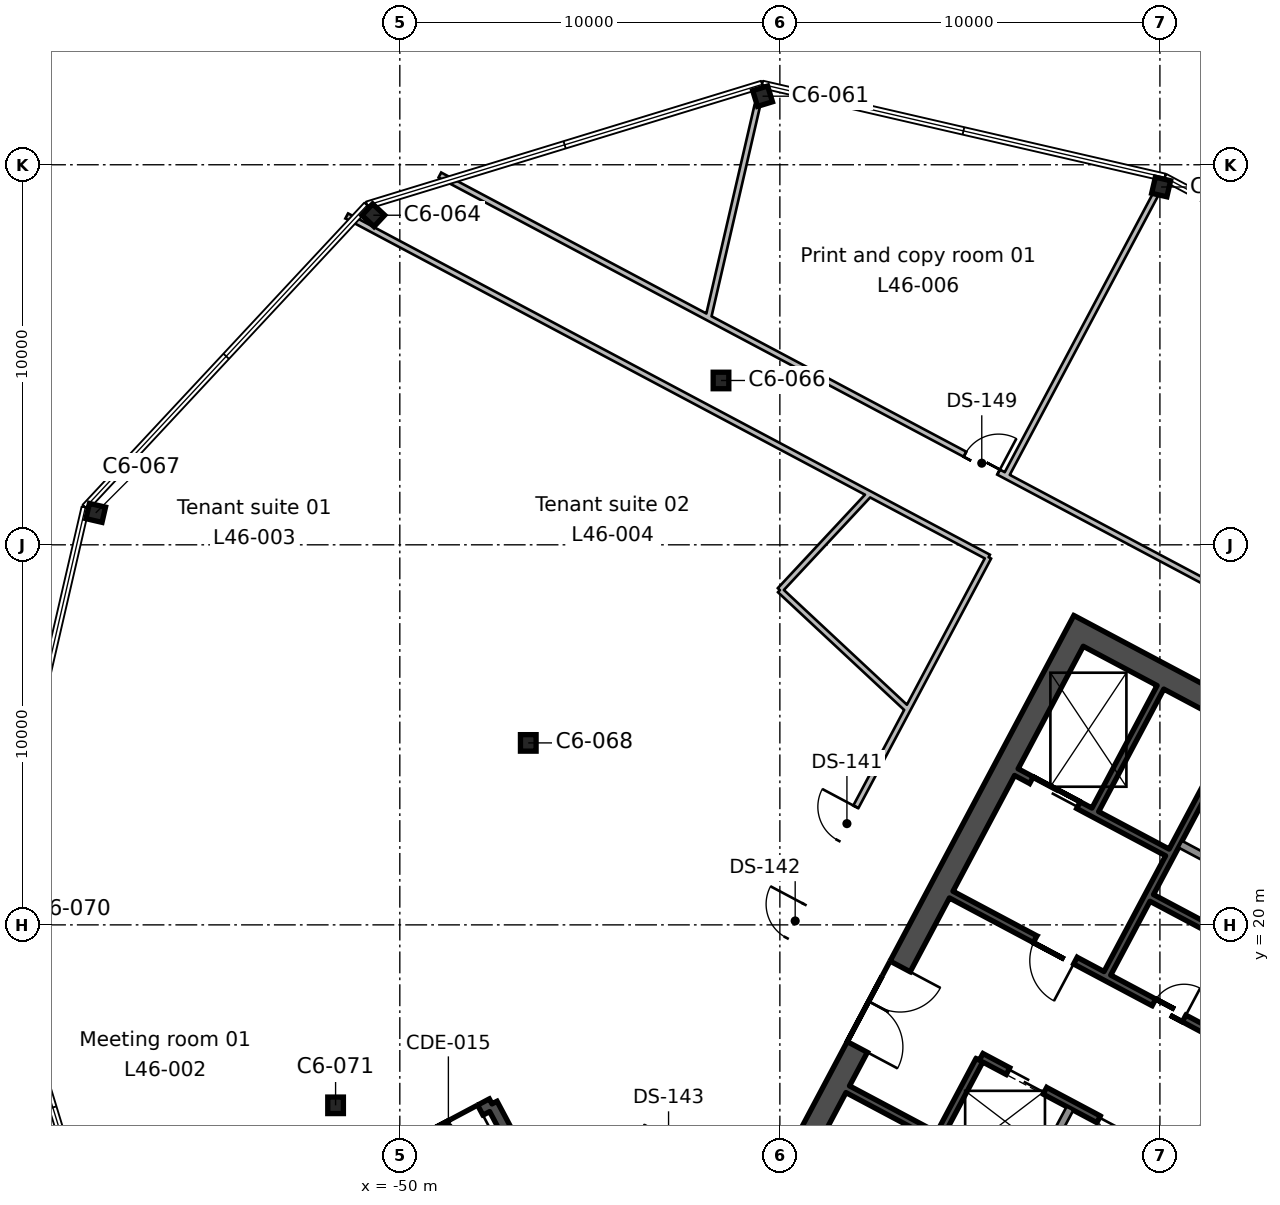
"""IFC4 building model, lengths in metres.
Left out: names, types, materials, properties, quantities, classifications, styles, units other than length and angle.
Written with IfcOpenShell. Run it as: python <this file> out.ifc"""

import sys

from ifc_helpers import new_model, si_unit, direction, frame, frame_2d, origin, origin_2d, place, context, subcontext, project, spatial, rectangle, i_section, extrude, element, fill, save


model = new_model("IFC4")
c1 = context("Model", 3, precision=1e-05, world=origin(), true_north=direction((0.0, 1.0)))
c2 = subcontext(c1, "Body", "Model", "MODEL_VIEW")
j1 = project(units=[si_unit("LENGTHUNIT", "METRE"), si_unit("PLANEANGLEUNIT", "RADIAN")], contexts=[c1])
p1 = place(None, origin())
s1 = spatial("IfcSite", under=j1, at=p1, CompositionType="ELEMENT")
p2 = place(p1, origin())
s2 = spatial("IfcBuilding", under=s1, at=p2, CompositionType="ELEMENT")
p3 = place(p2, frame((0.0, 0.0, 213.0)))
s3 = spatial("IfcBuildingStorey", under=s2, at=p3, CompositionType="ELEMENT", Elevation=213.0)
for number, where, z_axis, x_axis in (
    (1, (-51.69, 15.252, 0.0), (0.0, 0.0, 1.0), (1.0, 0.0, 0.0)),
    (2, (-46.62, 24.788, 0.0), (0.0, 0.0, 1.0), (1.0, 0.0, 0.0)),
    (3, (-58.001, 30.84, 0.0), (0.0, 0.0, 1.0), (-0.225, -0.974, 0.0)),
    (4, (-41.549, 34.324, 0.0), (0.0, 0.0, 1.0), (1.0, 0.0, 0.0)),
    (5, (-50.697, 38.672, 0.0), (0.0, 0.0, 1.0), (-0.682, -0.731, 0.0)),
    (6, (-29.968, 39.415, 0.0), (0.0, 0.0, 1.0), (-0.974, 0.225, 0.0)),
    (7, (-40.455, 41.804, 0.0), (0.0, 0.0, 1.0), (-0.956, -0.292, 0.0)),
):
    element("IfcColumn", number, at=place(p3, frame(where, z_axis=z_axis, x_axis=x_axis)), inside=s3, PredefinedType="COLUMN", context=c2, shape_type="SweptSolid", body=[
        extrude(i_section(OverallWidth=0.412, OverallDepth=0.434, WebThickness=0.036, FlangeThickness=0.057, FilletRadius=0.015, at=origin_2d()), origin(), (0.0, 0.0, 1.0), 3.9),
    ])
p4 = place(p3, frame((-32.0, 28.001, 0.0), z_axis=(0.0, 0.0, 1.0), x_axis=(-0.469468958625, -0.882948977511, 0.0)))
e8 = element("IfcWall", 8, at=p4, inside=s3, PredefinedType="SHEAR", context=c2, shape_type="SweptSolid", body=[
    extrude(rectangle(XDim=19.4, YDim=0.6, at=frame_2d((9.7, 0.0))), origin(), (0.0, 0.0, 1.0), 3.9),
])
p5 = place(p4, frame((10.3, 0.0, 0.0)))
e9 = element("IfcOpeningElement", 9, at=p5, cuts=e8, PredefinedType="OPENING", context=c2, shape_type="SweptSolid", body=[
    extrude(rectangle(XDim=2.4, YDim=2.4, at=frame_2d((1.2, 1.2))), frame((0.0, 0.31, 0.0), z_axis=(0.0, -1.0, 0.0), x_axis=(1.0, 0.0, 0.0)), (0.0, 0.0, 1.0), 0.62),
])
p6 = place(p3, frame((-14.041, 18.112, 0.0), z_axis=(0.0, 0.0, 1.0), x_axis=(-0.882947755831, 0.46947125628, 0.0)))
e10 = element("IfcWall", 10, at=p6, inside=s3, PredefinedType="SHEAR", context=c2, shape_type="SweptSolid", body=[
    extrude(rectangle(XDim=20.2, YDim=0.6, at=frame_2d((10.1, 0.0))), origin(), (0.0, 0.0, 1.0), 3.9),
])
p7 = place(p3, frame((-32.366, 15.171, 0.0), z_axis=(0.0, 0.0, 1.0), x_axis=(-0.469487830541, -0.882938942948, 0.0)))
e11 = element("IfcWall", 11, at=p7, inside=s3, PredefinedType="SOLIDWALL", context=c2, shape_type="SweptSolid", body=[
    extrude(rectangle(XDim=2.2, YDim=0.2, at=frame_2d((1.1, 0.0))), origin(), (0.0, 0.0, 1.0), 3.9),
])
p8 = place(p3, frame((-27.955, 25.171, 0.0), z_axis=(0.0, 0.0, 1.0), x_axis=(-0.469480409012, -0.88294288918, 0.0)))
e12 = element("IfcWall", 12, at=p8, inside=s3, PredefinedType="SHEAR", context=c2, shape_type="SweptSolid", body=[
    extrude(rectangle(XDim=7.3, YDim=0.2, at=frame_2d((3.65, 0.0))), origin(), (0.0, 0.0, 1.0), 3.9),
])
p9 = place(p3, frame((-34.75, 16.438, 0.0), z_axis=(0.0, 0.0, 1.0), x_axis=(-0.469401318492, -0.882984938828, 0.0)))
e13 = element("IfcWall", 13, at=p9, inside=s3, PredefinedType="SHEAR", context=c2, shape_type="SweptSolid", body=[
    extrude(rectangle(XDim=2.2, YDim=0.2, at=frame_2d((1.1, 0.0))), origin(), (0.0, 0.0, 1.0), 3.9),
])
p10 = place(p3, frame((-29.986, 26.25, 0.0), z_axis=(0.0, 0.0, 1.0), x_axis=(-0.469494272526, -0.882935517501, 0.0)))
e14 = element("IfcWall", 14, at=p10, inside=s3, PredefinedType="SHEAR", context=c2, shape_type="SweptSolid", body=[
    extrude(rectangle(XDim=3.65, YDim=0.2, at=frame_2d((1.825, 0.0))), origin(), (0.0, 0.0, 1.0), 3.9),
])
p11 = place(p3, frame((-24.872, 19.68, 0.0), z_axis=(0.0, 0.0, 1.0), x_axis=(-0.882953967957, 0.469459572775, 0.0)))
e15 = element("IfcWall", 15, at=p11, inside=s3, PredefinedType="SOLIDWALL", context=c2, shape_type="SweptSolid", body=[
    extrude(rectangle(XDim=5.2, YDim=0.2, at=frame_2d((2.6, 0.0))), origin(), (0.0, 0.0, 1.0), 3.9),
])
p12 = place(p3, frame((-29.804, 21.906, 0.0), z_axis=(0.0, 0.0, 1.0), x_axis=(-0.882960433586, 0.469447412093, 0.0)))
e16 = element("IfcWall", 16, at=p12, inside=s3, PredefinedType="SHEAR", context=c2, shape_type="SweptSolid", body=[
    extrude(rectangle(XDim=4.5, YDim=0.2, at=frame_2d((2.25, 0.0))), origin(), (0.0, 0.0, 1.0), 3.9),
])
p13 = place(p12, frame((2.65, 0.0, 0.0)))
e17 = element("IfcOpeningElement", 17, at=p13, cuts=e16, PredefinedType="OPENING", context=c2, shape_type="SweptSolid", body=[
    extrude(rectangle(XDim=1.4, YDim=2.4, at=frame_2d((0.7, 1.2))), frame((0.0, 0.11, 0.0), z_axis=(0.0, -1.0, 0.0), x_axis=(1.0, 0.0, 0.0)), (0.0, 0.0, 1.0), 0.22),
])
p14 = place(p3, frame((-25.623, 18.268, 0.0), z_axis=(0.0, 0.0, 1.0), x_axis=(-0.882953967957, 0.469459572775, 0.0)))
e18 = element("IfcWall", 18, at=p14, inside=s3, PredefinedType="SHEAR", context=c2, shape_type="SweptSolid", body=[
    extrude(rectangle(XDim=5.2, YDim=0.2, at=frame_2d((2.6, 0.0))), origin(), (0.0, 0.0, 1.0), 3.9),
])
p15 = place(p3, frame((-26.662, 16.102, 0.0), z_axis=(0.0, 0.0, 1.0), x_axis=(-0.882940221191, 0.469485426614, 0.0)))
e19 = element("IfcWall", 19, at=p15, inside=s3, PredefinedType="SHEAR", context=c2, shape_type="SweptSolid", body=[
    extrude(rectangle(XDim=10.0, YDim=0.2, at=frame_2d((5.0, 0.0))), origin(), (0.0, 0.0, 1.0), 3.9),
])
p16 = place(p15, frame((6.3, 0.0, 0.0)))
e20 = element("IfcOpeningElement", 20, at=p16, cuts=e19, PredefinedType="OPENING", context=c2, shape_type="SweptSolid", body=[
    extrude(rectangle(XDim=1.2, YDim=2.1, at=frame_2d((0.6, 1.05))), frame((0.0, 0.11, 0.0), z_axis=(0.0, -1.0, 0.0), x_axis=(1.0, 0.0, 0.0)), (0.0, 0.0, 1.0), 0.22),
])
p17 = place(p15, frame((0.36, 0.0, 0.0)))
e21 = element("IfcOpeningElement", 21, at=p17, cuts=e19, PredefinedType="OPENING", context=c2, shape_type="SweptSolid", body=[
    extrude(rectangle(XDim=0.9, YDim=2.1, at=frame_2d((0.45, 1.05))), frame((0.0, 0.11, 0.0), z_axis=(0.0, -1.0, 0.0), x_axis=(1.0, 0.0, 0.0)), (0.0, 0.0, 1.0), 0.22),
])
p18 = place(p15, frame((3.06, 0.0, 0.0)))
e22 = element("IfcOpeningElement", 22, at=p18, cuts=e19, PredefinedType="OPENING", context=c2, shape_type="SweptSolid", body=[
    extrude(rectangle(XDim=0.9, YDim=2.1, at=frame_2d((0.45, 1.05))), frame((0.0, 0.11, 0.0), z_axis=(0.0, -1.0, 0.0), x_axis=(1.0, 0.0, 0.0)), (0.0, 0.0, 1.0), 0.22),
])
p19 = place(p3, frame((-29.935, 13.991, 0.0), z_axis=(0.0, 0.0, 1.0), x_axis=(-0.882952937579, 0.469461510692, 0.0)))
e23 = element("IfcWall", 23, at=p19, inside=s3, PredefinedType="SHEAR", context=c2, shape_type="SweptSolid", body=[
    extrude(rectangle(XDim=5.4, YDim=0.2, at=frame_2d((2.7, 0.0))), origin(), (0.0, 0.0, 1.0), 3.9),
])
p20 = place(p19, frame((0.8, 0.0, 0.0)))
e24 = element("IfcOpeningElement", 24, at=p20, cuts=e23, PredefinedType="OPENING", context=c2, shape_type="SweptSolid", body=[
    extrude(rectangle(XDim=1.1, YDim=2.1, at=frame_2d((0.55, 1.05))), frame((0.0, 0.11, 0.0), z_axis=(0.0, -1.0, 0.0), x_axis=(1.0, 0.0, 0.0)), (0.0, 0.0, 1.0), 0.22),
])
p21 = place(p19, frame((3.5, 0.0, 0.0)))
e25 = element("IfcOpeningElement", 25, at=p21, cuts=e23, PredefinedType="OPENING", context=c2, shape_type="SweptSolid", body=[
    extrude(rectangle(XDim=1.1, YDim=2.1, at=frame_2d((0.55, 1.05))), frame((0.0, 0.11, 0.0), z_axis=(0.0, -1.0, 0.0), x_axis=(1.0, 0.0, 0.0)), (0.0, 0.0, 1.0), 0.22),
])
p22 = place(p3, frame((-31.15, 11.919, 0.0), z_axis=(0.0, 0.0, 1.0), x_axis=(-0.882940221191, 0.469485426614, 0.0)))
e26 = element("IfcWall", 26, at=p22, inside=s3, PredefinedType="SHEAR", context=c2, shape_type="SweptSolid", body=[
    extrude(rectangle(XDim=8.0, YDim=0.2, at=frame_2d((4.0, 0.0))), origin(), (0.0, 0.0, 1.0), 3.9),
])
p23 = place(p3, frame((-47.574, 15.29, 0.0), z_axis=(0.0, 0.0, 1.0), x_axis=(0.469443498566, -0.882962514297, 0.0)))
e27 = element("IfcWall", 27, at=p23, inside=s3, PredefinedType="SHEAR", context=c2, shape_type="SweptSolid", body=[
    extrude(rectangle(XDim=4.85, YDim=0.3, at=frame_2d((2.425, 0.0))), origin(), (0.0, 0.0, 1.0), 3.9),
])
p24 = place(p3, frame((-54.903, 11.393, 0.0), z_axis=(0.0, 0.0, 1.0), x_axis=(0.882939326045, 0.469487110071, 0.0)))
e28 = element("IfcWall", 28, at=p24, inside=s3, PredefinedType="SHEAR", context=c2, shape_type="SweptSolid", body=[
    extrude(rectangle(XDim=8.3, YDim=0.3, at=frame_2d((4.15, 0.0))), origin(), (0.0, 0.0, 1.0), 3.9),
])
p25 = place(p24, frame((6.05, 0.0, 0.0)))
e29 = element("IfcOpeningElement", 29, at=p25, cuts=e28, PredefinedType="OPENING", context=c2, shape_type="SweptSolid", body=[
    extrude(rectangle(XDim=1.9, YDim=2.1, at=frame_2d((0.95, 1.05))), frame((0.0, 0.16, 0.0), z_axis=(0.0, -1.0, 0.0), x_axis=(1.0, 0.0, 0.0)), (0.0, 0.0, 1.0), 0.32),
])
p26 = place(p3, frame((-60.162, 20.265, 0.0), z_axis=(0.0, 0.0, 1.0), x_axis=(0.974367298847, -0.224963034603, 0.0)))
e30 = element("IfcWall", 30, at=p26, inside=s3, PredefinedType="PARTITIONING", context=c2, shape_type="SweptSolid", body=[
    extrude(rectangle(XDim=18.256, YDim=0.15, at=frame_2d((9.128, 0.0))), origin(), (0.0, 0.0, 1.0), 3.54),
])
p27 = place(p3, frame((-54.714, 35.096, 0.0), z_axis=(0.0, 0.0, 1.0), x_axis=(0.731383697129, -0.681966192398, 0.0)))
e31 = element("IfcWall", 31, at=p27, inside=s3, PredefinedType="PARTITIONING", context=c2, shape_type="SweptSolid", body=[
    extrude(rectangle(XDim=21.105, YDim=0.15, at=frame_2d((10.553, 0.0))), origin(), (0.0, 0.0, 1.0), 3.54),
])
p28 = place(p3, frame((-41.92, 15.734, 0.0), z_axis=(0.0, 0.0, 1.0), x_axis=(-0.731382644917, 0.681967320855, 0.0)))
e32 = element("IfcWall", 32, at=p28, inside=s3, PredefinedType="PARTITIONING", context=c2, shape_type="SweptSolid", body=[
    extrude(rectangle(XDim=21.793, YDim=0.15, at=frame_2d((10.896, 0.0))), origin(), (0.0, 0.0, 1.0), 3.54),
])
p29 = place(p3, frame((-37.64, 31.339, 0.0), z_axis=(0.0, 0.0, 1.0), x_axis=(-0.681983873773, -0.731367210035, 0.0)))
e33 = element("IfcWall", 33, at=p29, inside=s3, PredefinedType="PARTITIONING", context=c2, shape_type="SweptSolid", body=[
    extrude(rectangle(XDim=3.461, YDim=0.15, at=frame_2d((1.73, 0.0))), origin(), (0.0, 0.0, 1.0), 3.54),
])
p30 = place(p3, frame((-40.0, 28.808, 0.0), z_axis=(0.0, 0.0, 1.0), x_axis=(0.731231770063, -0.682129092218, 0.0)))
e34 = element("IfcWall", 34, at=p30, inside=s3, PredefinedType="PARTITIONING", context=c2, shape_type="SweptSolid", body=[
    extrude(rectangle(XDim=4.599, YDim=0.15, at=frame_2d((2.3, 0.0))), origin(), (0.0, 0.0, 1.0), 3.54),
])
p31 = place(p3, frame((-41.921, 15.733, 0.0), z_axis=(0.0, 0.0, 1.0), x_axis=(0.469481161914, 0.882942488845, 0.0)))
e35 = element("IfcWall", 35, at=p31, inside=s3, PredefinedType="PARTITIONING", context=c2, shape_type="SweptSolid", body=[
    extrude(rectangle(XDim=15.79, YDim=0.15, at=frame_2d((7.895, 0.0))), origin(), (0.0, 0.0, 1.0), 3.54),
])
p32 = place(p31, frame((7.35, 0.0, 0.0)))
e36 = element("IfcOpeningElement", 36, at=p32, cuts=e35, PredefinedType="OPENING", context=c2, shape_type="SweptSolid", body=[
    extrude(rectangle(XDim=1.0, YDim=2.1, at=frame_2d((0.5, 1.05))), frame((0.0, 0.085, 0.0), z_axis=(0.0, -1.0, 0.0), x_axis=(1.0, 0.0, 0.0)), (0.0, 0.0, 1.0), 0.17),
])
p33 = place(p31, frame((4.45, 0.0, 0.0)))
e37 = element("IfcOpeningElement", 37, at=p33, cuts=e35, PredefinedType="OPENING", context=c2, shape_type="SweptSolid", body=[
    extrude(rectangle(XDim=1.0, YDim=2.1, at=frame_2d((0.5, 1.05))), frame((0.0, 0.085, 0.0), z_axis=(0.0, -1.0, 0.0), x_axis=(1.0, 0.0, 0.0)), (0.0, 0.0, 1.0), 0.17),
])
p34 = place(p3, frame((-34.508, 29.674, 0.0), z_axis=(0.0, 0.0, 1.0), x_axis=(-0.882947928049, 0.469470932384, 0.0)))
e38 = element("IfcWall", 38, at=p34, inside=s3, PredefinedType="PARTITIONING", context=c2, shape_type="SweptSolid", body=[
    extrude(rectangle(XDim=19.128, YDim=0.15, at=frame_2d((9.564, 0.0))), origin(), (0.0, 0.0, 1.0), 3.54),
])
p35 = place(p3, frame((-48.947, 39.73, 0.0), z_axis=(0.0, 0.0, 1.0), x_axis=(0.882945454821, -0.469475583828, 0.0)))
e39 = element("IfcWall", 39, at=p35, inside=s3, PredefinedType="PARTITIONING", context=c2, shape_type="SweptSolid", body=[
    extrude(rectangle(XDim=55.436, YDim=0.15, at=frame_2d((27.718, 0.0))), origin(), (0.0, 0.0, 1.0), 3.54),
])
p36 = place(p35, frame((28.35, 0.0, 0.0)))
e40 = element("IfcOpeningElement", 40, at=p36, cuts=e39, PredefinedType="OPENING", context=c2, shape_type="SweptSolid", body=[
    extrude(rectangle(XDim=1.8, YDim=2.1, at=frame_2d((0.9, 1.05))), frame((0.0, 0.085, 0.0), z_axis=(0.0, -1.0, 0.0), x_axis=(1.0, 0.0, 0.0)), (0.0, 0.0, 1.0), 0.17),
])
p37 = place(p35, frame((26.75, 0.0, 0.0)))
e41 = element("IfcOpeningElement", 41, at=p37, cuts=e39, PredefinedType="OPENING", context=c2, shape_type="SweptSolid", body=[
    extrude(rectangle(XDim=1.0, YDim=2.1, at=frame_2d((0.5, 1.05))), frame((0.0, 0.085, 0.0), z_axis=(0.0, -1.0, 0.0), x_axis=(1.0, 0.0, 0.0)), (0.0, 0.0, 1.0), 0.17),
])
p38 = place(p35, frame((15.65, 0.0, 0.0)))
e42 = element("IfcOpeningElement", 42, at=p38, cuts=e39, PredefinedType="OPENING", context=c2, shape_type="SweptSolid", body=[
    extrude(rectangle(XDim=1.0, YDim=2.1, at=frame_2d((0.5, 1.05))), frame((0.0, 0.085, 0.0), z_axis=(0.0, -1.0, 0.0), x_axis=(1.0, 0.0, 0.0)), (0.0, 0.0, 1.0), 0.17),
])
p39 = place(p3, frame((-41.921, 15.733, 0.0), z_axis=(0.0, 0.0, 1.0), x_axis=(-0.468752714774, -0.883329435937, 0.0)))
e43 = element("IfcWall", 43, at=p39, inside=s3, PredefinedType="PARTITIONING", context=c2, shape_type="SweptSolid", body=[
    extrude(rectangle(XDim=4.214, YDim=0.15, at=frame_2d((2.107, 0.0))), origin(), (0.0, 0.0, 1.0), 3.54),
])
p40 = place(p39, frame((1.65, 0.0, 0.0)))
e44 = element("IfcOpeningElement", 44, at=p40, cuts=e43, PredefinedType="OPENING", context=c2, shape_type="SweptSolid", body=[
    extrude(rectangle(XDim=1.0, YDim=2.1, at=frame_2d((0.5, 1.05))), frame((0.0, 0.085, 0.0), z_axis=(0.0, -1.0, 0.0), x_axis=(1.0, 0.0, 0.0)), (0.0, 0.0, 1.0), 0.17),
])
p41 = place(p3, frame((-30.11, 39.225, 0.0), z_axis=(0.0, 0.0, 1.0), x_axis=(-0.469401779971, -0.882984693502, 0.0)))
e45 = element("IfcWall", 45, at=p41, inside=s3, PredefinedType="PARTITIONING", context=c2, shape_type="SweptSolid", body=[
    extrude(rectangle(XDim=8.398, YDim=0.15, at=frame_2d((4.199, 0.0))), origin(), (0.0, 0.0, 1.0), 3.54),
])
p42 = place(p3, frame((-41.883, 35.974, 0.0), z_axis=(0.0, 0.0, 1.0), x_axis=(0.225018240408, 0.97435455122, 0.0)))
e46 = element("IfcWall", 46, at=p42, inside=s3, PredefinedType="PARTITIONING", context=c2, shape_type="SweptSolid", body=[
    extrude(rectangle(XDim=5.729, YDim=0.15, at=frame_2d((2.864, 0.0))), origin(), (0.0, 0.0, 1.0), 3.54),
])
p43 = place(p5, origin())
e47 = element("IfcDoor", 47, at=p43, inside=s3, OperationType="DOUBLE_DOOR_SINGLE_SWING", PredefinedType="DOOR", context=c2, shape_type="SweptSolid", body=[
    extrude(rectangle(XDim=2.4, YDim=2.4, at=frame_2d((1.2, 1.2))), frame((0.0, 0.025, 0.0), z_axis=(0.0, -1.0, 0.0), x_axis=(1.0, 0.0, 0.0)), (0.0, 0.0, 1.0), 0.05),
])
fill(e9, e47)
p44 = place(p16, origin())
e48 = element("IfcDoor", 48, at=p44, inside=s3, OperationType="SINGLE_SWING_LEFT", PredefinedType="DOOR", context=c2, shape_type="SweptSolid", body=[
    extrude(rectangle(XDim=1.2, YDim=2.1, at=frame_2d((0.6, 1.05))), frame((0.0, 0.025, 0.0), z_axis=(0.0, -1.0, 0.0), x_axis=(1.0, 0.0, 0.0)), (0.0, 0.0, 1.0), 0.05),
])
fill(e20, e48)
p45 = place(p18, frame((0.9, 0.0, 0.0), z_axis=(0.0, 0.0, 1.0), x_axis=(-1.0, 0.0, 0.0)))
e49 = element("IfcDoor", 49, at=p45, inside=s3, OperationType="SINGLE_SWING_RIGHT", PredefinedType="DOOR", context=c2, shape_type="SweptSolid", body=[
    extrude(rectangle(XDim=0.9, YDim=2.1, at=frame_2d((0.45, 1.05))), frame((0.0, 0.025, 0.0), z_axis=(0.0, -1.0, 0.0), x_axis=(1.0, 0.0, 0.0)), (0.0, 0.0, 1.0), 0.05),
])
fill(e22, e49)
p46 = place(p20, origin())
e50 = element("IfcDoor", 50, at=p46, inside=s3, OperationType="DOUBLE_DOOR_SLIDING", PredefinedType="DOOR", context=c2, shape_type="SweptSolid", body=[
    extrude(rectangle(XDim=1.1, YDim=2.1, at=frame_2d((0.55, 1.05))), frame((0.0, 0.025, 0.0), z_axis=(0.0, -1.0, 0.0), x_axis=(1.0, 0.0, 0.0)), (0.0, 0.0, 1.0), 0.05),
])
fill(e24, e50)
p47 = place(p21, origin())
e51 = element("IfcDoor", 51, at=p47, inside=s3, OperationType="DOUBLE_DOOR_SLIDING", PredefinedType="DOOR", context=c2, shape_type="SweptSolid", body=[
    extrude(rectangle(XDim=1.1, YDim=2.1, at=frame_2d((0.55, 1.05))), frame((0.0, 0.025, 0.0), z_axis=(0.0, -1.0, 0.0), x_axis=(1.0, 0.0, 0.0)), (0.0, 0.0, 1.0), 0.05),
])
fill(e25, e51)
p48 = place(p13, origin())
e52 = element("IfcDoor", 52, at=p48, inside=s3, OperationType="DOUBLE_DOOR_SLIDING", PredefinedType="DOOR", context=c2, shape_type="SweptSolid", body=[
    extrude(rectangle(XDim=1.4, YDim=2.4, at=frame_2d((0.7, 1.2))), frame((0.0, 0.025, 0.0), z_axis=(0.0, -1.0, 0.0), x_axis=(1.0, 0.0, 0.0)), (0.0, 0.0, 1.0), 0.05),
])
fill(e17, e52)
p49 = place(p25, frame((1.9, 0.0, 0.0), z_axis=(0.0, 0.0, 1.0), x_axis=(-1.0, 0.0, 0.0)))
e53 = element("IfcDoor", 53, at=p49, inside=s3, OperationType="DOUBLE_DOOR_SINGLE_SWING", PredefinedType="DOOR", context=c2, shape_type="SweptSolid", body=[
    extrude(rectangle(XDim=1.9, YDim=2.1, at=frame_2d((0.95, 1.05))), frame((0.0, 0.025, 0.0), z_axis=(0.0, -1.0, 0.0), x_axis=(1.0, 0.0, 0.0)), (0.0, 0.0, 1.0), 0.05),
])
fill(e29, e53)
p50 = place(p32, origin())
e54 = element("IfcDoor", 54, at=p50, inside=s3, OperationType="SINGLE_SWING_RIGHT", PredefinedType="DOOR", context=c2, shape_type="SweptSolid", body=[
    extrude(rectangle(XDim=1.0, YDim=2.1, at=frame_2d((0.5, 1.05))), frame((0.0, 0.025, 0.0), z_axis=(0.0, -1.0, 0.0), x_axis=(1.0, 0.0, 0.0)), (0.0, 0.0, 1.0), 0.05),
])
fill(e36, e54)
p51 = place(p33, origin())
e55 = element("IfcDoor", 55, at=p51, inside=s3, OperationType="SINGLE_SWING_RIGHT", PredefinedType="DOOR", context=c2, shape_type="SweptSolid", body=[
    extrude(rectangle(XDim=1.0, YDim=2.1, at=frame_2d((0.5, 1.05))), frame((0.0, 0.025, 0.0), z_axis=(0.0, -1.0, 0.0), x_axis=(1.0, 0.0, 0.0)), (0.0, 0.0, 1.0), 0.05),
])
fill(e37, e55)
p52 = place(p38, origin())
e56 = element("IfcDoor", 56, at=p52, inside=s3, OperationType="SINGLE_SWING_RIGHT", PredefinedType="DOOR", context=c2, shape_type="SweptSolid", body=[
    extrude(rectangle(XDim=1.0, YDim=2.1, at=frame_2d((0.5, 1.05))), frame((0.0, 0.025, 0.0), z_axis=(0.0, -1.0, 0.0), x_axis=(1.0, 0.0, 0.0)), (0.0, 0.0, 1.0), 0.05),
])
fill(e42, e56)
save(model, sys.argv[1])
